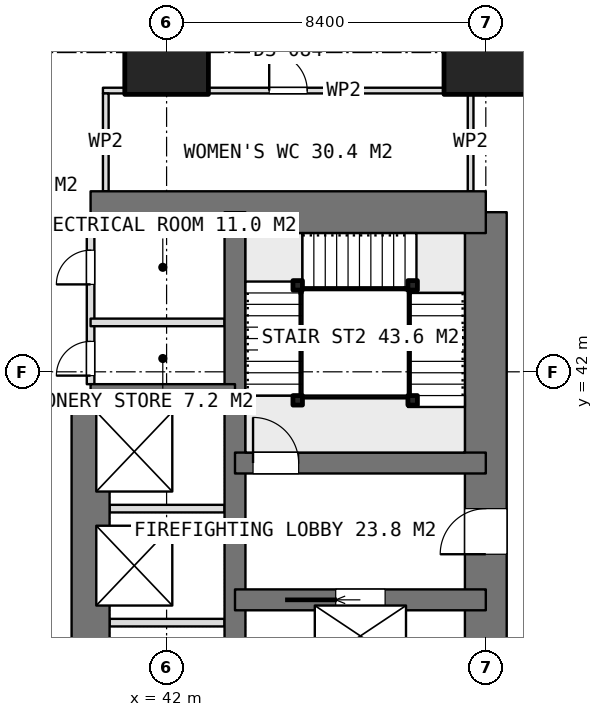
"""IFC4 building model, lengths in metres.
Left out: names, types, materials, properties, quantities, classifications, styles, units other than length and angle.
Written with IfcOpenShell. Run it as: python <this file> out.ifc"""

import sys

from ifc_helpers import new_model, si_unit, direction, frame, frame_2d, origin, origin_2d, place, context, subcontext, project, spatial, rectangle, extrude, element, fill, save


model = new_model("IFC4")
c1 = context("Model", 3, precision=1e-05, world=origin(), true_north=direction((0.0, 1.0)))
c2 = subcontext(c1, "Body", "Model", "MODEL_VIEW")
j1 = project(units=[si_unit("LENGTHUNIT", "METRE"), si_unit("PLANEANGLEUNIT", "RADIAN")], contexts=[c1])
p1 = place(None, origin())
s1 = spatial("IfcSite", under=j1, at=p1, CompositionType="ELEMENT")
p2 = place(p1, origin())
s2 = spatial("IfcBuilding", under=s1, at=p2, CompositionType="ELEMENT")
p3 = place(p2, frame((0.0, 0.0, 74.15)))
s3 = spatial("IfcBuildingStorey", under=s2, at=p3, CompositionType="ELEMENT", Elevation=74.15)
p4 = place(p3, frame((40.0, 46.2, 0.0), z_axis=(0.0, 0.0, 1.0), x_axis=(1.0, 0.0, 0.0)))
e1 = element("IfcWall", 1, at=p4, inside=s3, PredefinedType="SHEAR", context=c2, shape_type="SweptSolid", body=[
    extrude(rectangle(XDim=10.4, YDim=1.1, at=frame_2d((5.2, 0.0))), origin(), (0.0, 0.0, 1.0), 3.75),
])
p5 = place(p3, frame((50.4, 21.0, 0.0), z_axis=(0.0, 0.0, 1.0), x_axis=(0.0, 1.0, 0.0)))
e2 = element("IfcWall", 2, at=p5, inside=s3, PredefinedType="SHEAR", context=c2, shape_type="SweptSolid", body=[
    extrude(rectangle(XDim=25.2, YDim=1.1, at=frame_2d((12.6, 0.0))), origin(), (0.0, 0.0, 1.0), 3.75),
])
p6 = place(p5, frame((16.2, 0.0, 0.0)))
e3 = element("IfcOpeningElement", 3, at=p6, cuts=e2, PredefinedType="OPENING", context=c2, shape_type="SweptSolid", body=[
    extrude(rectangle(XDim=1.2, YDim=2.1, at=frame_2d((0.6, 1.05))), frame((0.0, 0.56, 0.0), z_axis=(0.0, -1.0, 0.0), x_axis=(1.0, 0.0, 0.0)), (0.0, 0.0, 1.0), 1.12),
])
p7 = place(p5, frame((10.05, 0.0, 0.0)))
e4 = element("IfcOpeningElement", 4, at=p7, cuts=e2, PredefinedType="OPENING", context=c2, shape_type="SweptSolid", body=[
    extrude(rectangle(XDim=0.9, YDim=2.1, at=frame_2d((0.45, 1.05))), frame((0.0, 0.56, 0.0), z_axis=(0.0, -1.0, 0.0), x_axis=(1.0, 0.0, 0.0)), (0.0, 0.0, 1.0), 1.12),
])
p8 = place(p5, frame((7.45, 0.0, 0.0)))
e5 = element("IfcOpeningElement", 5, at=p8, cuts=e2, PredefinedType="OPENING", context=c2, shape_type="SweptSolid", body=[
    extrude(rectangle(XDim=0.9, YDim=2.1, at=frame_2d((0.45, 1.05))), frame((0.0, 0.56, 0.0), z_axis=(0.0, -1.0, 0.0), x_axis=(1.0, 0.0, 0.0)), (0.0, 0.0, 1.0), 1.12),
])
p9 = place(p5, frame((0.75, 0.0, 0.0)))
e6 = element("IfcOpeningElement", 6, at=p9, cuts=e2, PredefinedType="OPENING", context=c2, shape_type="SweptSolid", body=[
    extrude(rectangle(XDim=1.2, YDim=2.1, at=frame_2d((0.6, 1.05))), frame((0.0, 0.56, 0.0), z_axis=(0.0, -1.0, 0.0), x_axis=(1.0, 0.0, 0.0)), (0.0, 0.0, 1.0), 1.12),
])
p10 = place(p3, frame((43.8, 21.0, 0.0), z_axis=(0.0, 0.0, 1.0), x_axis=(0.0, 1.0, 0.0)))
e7 = element("IfcWall", 7, at=p10, inside=s3, PredefinedType="SHEAR", context=c2, shape_type="SweptSolid", body=[
    extrude(rectangle(XDim=25.2, YDim=0.55, at=frame_2d((12.6, 0.0))), origin(), (0.0, 0.0, 1.0), 3.75),
])
p11 = place(p3, frame((40.0, 23.4, 0.0), z_axis=(0.0, 0.0, 1.0), x_axis=(0.0, 1.0, 0.0)))
e8 = element("IfcWall", 8, at=p11, inside=s3, PredefinedType="SHEAR", context=c2, shape_type="SweptSolid", body=[
    extrude(rectangle(XDim=18.0, YDim=1.0, at=frame_2d((9.0, 0.0))), origin(), (0.0, 0.0, 1.0), 3.75),
])
p12 = place(p3, frame((40.0, 41.4, 0.0), z_axis=(0.0, 0.0, 1.0), x_axis=(1.0, 0.0, 0.0)))
e9 = element("IfcWall", 9, at=p12, inside=s3, PredefinedType="SHEAR", context=c2, shape_type="SweptSolid", body=[
    extrude(rectangle(XDim=3.8, YDim=0.55, at=frame_2d((1.9, 0.0))), origin(), (0.0, 0.0, 1.0), 3.75),
])
p13 = place(p3, frame((43.8, 36.0, 0.0), z_axis=(0.0, 0.0, 1.0), x_axis=(1.0, 0.0, 0.0)))
e10 = element("IfcWall", 10, at=p13, inside=s3, PredefinedType="SHEAR", context=c2, shape_type="SweptSolid", body=[
    extrude(rectangle(XDim=6.6, YDim=0.55, at=frame_2d((3.3, 0.0))), origin(), (0.0, 0.0, 1.0), 3.75),
])
p14 = place(p13, frame((2.65, 0.0, 0.0)))
e11 = element("IfcOpeningElement", 11, at=p14, cuts=e10, PredefinedType="OPENING", context=c2, shape_type="SweptSolid", body=[
    extrude(rectangle(XDim=1.3, YDim=2.1, at=frame_2d((0.65, 1.05))), frame((0.0, 0.285, 0.0), z_axis=(0.0, -1.0, 0.0), x_axis=(1.0, 0.0, 0.0)), (0.0, 0.0, 1.0), 0.57),
])
p15 = place(p3, frame((43.8, 39.6, 0.0), z_axis=(0.0, 0.0, 1.0), x_axis=(1.0, 0.0, 0.0)))
e12 = element("IfcWall", 12, at=p15, inside=s3, PredefinedType="SHEAR", context=c2, shape_type="SweptSolid", body=[
    extrude(rectangle(XDim=6.6, YDim=0.55, at=frame_2d((3.3, 0.0))), origin(), (0.0, 0.0, 1.0), 3.75),
])
p16 = place(p15, frame((0.475, 0.0, 0.0)))
e13 = element("IfcOpeningElement", 13, at=p16, cuts=e12, PredefinedType="OPENING", context=c2, shape_type="SweptSolid", body=[
    extrude(rectangle(XDim=1.2, YDim=2.1, at=frame_2d((0.6, 1.05))), frame((0.0, 0.285, 0.0), z_axis=(0.0, -1.0, 0.0), x_axis=(1.0, 0.0, 0.0)), (0.0, 0.0, 1.0), 0.57),
])
for number, where, z_axis, x_axis in (
    (14, (42.0, 50.4, 0.0), (0.0, 0.0, 1.0), (1.0, 0.0, 0.0)),
    (15, (50.4, 50.4, 0.0), (0.0, 0.0, 1.0), (1.0, 0.0, 0.0)),
):
    element("IfcColumn", number, at=place(p3, frame(where, z_axis=z_axis, x_axis=x_axis)), inside=s3, PredefinedType="COLUMN", context=c2, shape_type="SweptSolid", body=[
        extrude(rectangle(XDim=2.2, YDim=2.2, at=origin_2d()), origin(), (0.0, 0.0, 1.0), 3.75),
    ])
for number, where, z_axis, x_axis in (
    (16, (40.5, 35.4, 0.0), (0.0, 0.0, 1.0), (1.0, 0.0, 0.0)),
    (17, (40.5, 38.4, 0.0), (0.0, 0.0, 1.0), (1.0, 0.0, 0.0)),
):
    element("IfcWall", number, at=place(p3, frame(where, z_axis=z_axis, x_axis=x_axis)), inside=s3, PredefinedType="PARTITIONING", context=c2, shape_type="SweptSolid", body=[
        extrude(rectangle(XDim=3.025, YDim=0.2, at=frame_2d((1.512, 0.0))), origin(), (0.0, 0.0, 1.0), 3.5),
    ])
p17 = place(p3, frame((40.0, 41.675, 0.0), z_axis=(0.0, 0.0, 1.0), x_axis=(0.0, 1.0, 0.0)))
e18 = element("IfcWall", 18, at=p17, inside=s3, PredefinedType="PARTITIONING", context=c2, shape_type="SweptSolid", body=[
    extrude(rectangle(XDim=3.975, YDim=0.2, at=frame_2d((1.987, 0.0))), origin(), (0.0, 0.0, 1.0), 3.5),
])
p18 = place(p17, frame((2.625, 0.0, 0.0)))
e19 = element("IfcOpeningElement", 19, at=p18, cuts=e18, PredefinedType="OPENING", context=c2, shape_type="SweptSolid", body=[
    extrude(rectangle(XDim=0.9, YDim=2.1, at=frame_2d((0.45, 1.05))), frame((0.0, 0.11, 0.0), z_axis=(0.0, -1.0, 0.0), x_axis=(1.0, 0.0, 0.0)), (0.0, 0.0, 1.0), 0.22),
])
p19 = place(p17, frame((0.225, 0.0, 0.0)))
e20 = element("IfcOpeningElement", 20, at=p19, cuts=e18, PredefinedType="OPENING", context=c2, shape_type="SweptSolid", body=[
    extrude(rectangle(XDim=0.9, YDim=2.1, at=frame_2d((0.45, 1.05))), frame((0.0, 0.11, 0.0), z_axis=(0.0, -1.0, 0.0), x_axis=(1.0, 0.0, 0.0)), (0.0, 0.0, 1.0), 0.22),
])
p20 = place(p3, frame((40.0, 43.3, 0.0), z_axis=(0.0, 0.0, 1.0), x_axis=(1.0, 0.0, 0.0)))
e21 = element("IfcWall", 21, at=p20, inside=s3, PredefinedType="PARTITIONING", context=c2, shape_type="SweptSolid", body=[
    extrude(rectangle(XDim=3.525, YDim=0.2, at=frame_2d((1.762, 0.0))), origin(), (0.0, 0.0, 1.0), 3.5),
])
p21 = place(p3, frame((40.325, 49.4, 0.0), z_axis=(0.0, 0.0, 1.0), x_axis=(1.0, 0.0, 0.0)))
e22 = element("IfcWall", 22, at=p21, inside=s3, PredefinedType="PARTITIONING", context=c2, shape_type="SweptSolid", body=[
    extrude(rectangle(XDim=9.75, YDim=0.15, at=frame_2d((4.875, 0.0))), origin(), (0.0, 0.0, 1.0), 3.5),
])
p22 = place(p21, frame((4.375, 0.0, 0.0)))
e23 = element("IfcOpeningElement", 23, at=p22, cuts=e22, PredefinedType="OPENING", context=c2, shape_type="SweptSolid", body=[
    extrude(rectangle(XDim=1.0, YDim=2.1, at=frame_2d((0.5, 1.05))), frame((0.0, 0.085, 0.0), z_axis=(0.0, -1.0, 0.0), x_axis=(1.0, 0.0, 0.0)), (0.0, 0.0, 1.0), 0.17),
])
for number, where, z_axis, x_axis in (
    (24, (40.4, 46.75, 0.0), (0.0, 0.0, 1.0), (0.0, 1.0, 0.0)),
    (25, (50.0, 46.75, 0.0), (0.0, 0.0, 1.0), (0.0, 1.0, 0.0)),
):
    element("IfcWall", number, at=place(p3, frame(where, z_axis=z_axis, x_axis=x_axis)), inside=s3, PredefinedType="PARTITIONING", context=c2, shape_type="SweptSolid", body=[
        extrude(rectangle(XDim=2.575, YDim=0.15, at=frame_2d((1.288, 0.0))), origin(), (0.0, 0.0, 1.0), 3.5),
    ])
for number, where, z_axis, x_axis in (
    (26, (45.45, 41.25, 0.0), (0.0, 0.0, 1.0), (1.0, 0.0, 0.0)),
    (27, (45.45, 44.275, 0.0), (0.0, 0.0, 1.0), (1.0, 0.0, 0.0)),
    (28, (48.475, 44.275, 0.0), (0.0, 0.0, 1.0), (1.0, 0.0, 0.0)),
    (29, (48.475, 41.25, 0.0), (0.0, 0.0, 1.0), (1.0, 0.0, 0.0)),
):
    element("IfcColumn", number, at=place(p3, frame(where, z_axis=z_axis, x_axis=x_axis)), inside=s3, PredefinedType="COLUMN", context=c2, shape_type="SweptSolid", body=[
        extrude(rectangle(XDim=0.25, YDim=0.25, at=origin_2d()), origin(), (0.0, 0.0, 1.0), 3.75),
    ])
p23 = place(p6, origin())
e30 = element("IfcDoor", 30, at=p23, inside=s3, OperationType="SINGLE_SWING_LEFT", PredefinedType="DOOR", context=c2, shape_type="SweptSolid", body=[
    extrude(rectangle(XDim=1.2, YDim=2.1, at=frame_2d((0.6, 1.05))), frame((0.0, 0.025, 0.0), z_axis=(0.0, -1.0, 0.0), x_axis=(1.0, 0.0, 0.0)), (0.0, 0.0, 1.0), 0.05),
])
fill(e3, e30)
p24 = place(p18, origin())
e31 = element("IfcDoor", 31, at=p24, inside=s3, OperationType="SINGLE_SWING_LEFT", PredefinedType="DOOR", context=c2, shape_type="SweptSolid", body=[
    extrude(rectangle(XDim=0.9, YDim=2.1, at=frame_2d((0.45, 1.05))), frame((0.0, 0.025, 0.0), z_axis=(0.0, -1.0, 0.0), x_axis=(1.0, 0.0, 0.0)), (0.0, 0.0, 1.0), 0.05),
])
fill(e19, e31)
p25 = place(p19, origin())
e32 = element("IfcDoor", 32, at=p25, inside=s3, OperationType="SINGLE_SWING_LEFT", PredefinedType="DOOR", context=c2, shape_type="SweptSolid", body=[
    extrude(rectangle(XDim=0.9, YDim=2.1, at=frame_2d((0.45, 1.05))), frame((0.0, 0.025, 0.0), z_axis=(0.0, -1.0, 0.0), x_axis=(1.0, 0.0, 0.0)), (0.0, 0.0, 1.0), 0.05),
])
fill(e20, e32)
p26 = place(p14, origin())
e33 = element("IfcDoor", 33, at=p26, inside=s3, OperationType="SLIDING_TO_LEFT", PredefinedType="USERDEFINED", context=c2, shape_type="SweptSolid", body=[
    extrude(rectangle(XDim=1.3, YDim=2.1, at=frame_2d((0.65, 1.05))), frame((0.0, 0.025, 0.0), z_axis=(0.0, -1.0, 0.0), x_axis=(1.0, 0.0, 0.0)), (0.0, 0.0, 1.0), 0.05),
])
fill(e11, e33)
p27 = place(p22, origin())
e34 = element("IfcDoor", 34, at=p27, inside=s3, OperationType="SINGLE_SWING_LEFT", PredefinedType="DOOR", context=c2, shape_type="SweptSolid", body=[
    extrude(rectangle(XDim=1.0, YDim=2.1, at=frame_2d((0.5, 1.05))), frame((0.0, 0.025, 0.0), z_axis=(0.0, -1.0, 0.0), x_axis=(1.0, 0.0, 0.0)), (0.0, 0.0, 1.0), 0.05),
])
fill(e23, e34)
p28 = place(p16, origin())
e35 = element("IfcDoor", 35, at=p28, inside=s3, OperationType="SINGLE_SWING_RIGHT", PredefinedType="DOOR", context=c2, shape_type="SweptSolid", body=[
    extrude(rectangle(XDim=1.2, YDim=2.1, at=frame_2d((0.6, 1.05))), frame((0.0, 0.025, 0.0), z_axis=(0.0, -1.0, 0.0), x_axis=(1.0, 0.0, 0.0)), (0.0, 0.0, 1.0), 0.05),
])
fill(e13, e35)
save(model, sys.argv[1])
